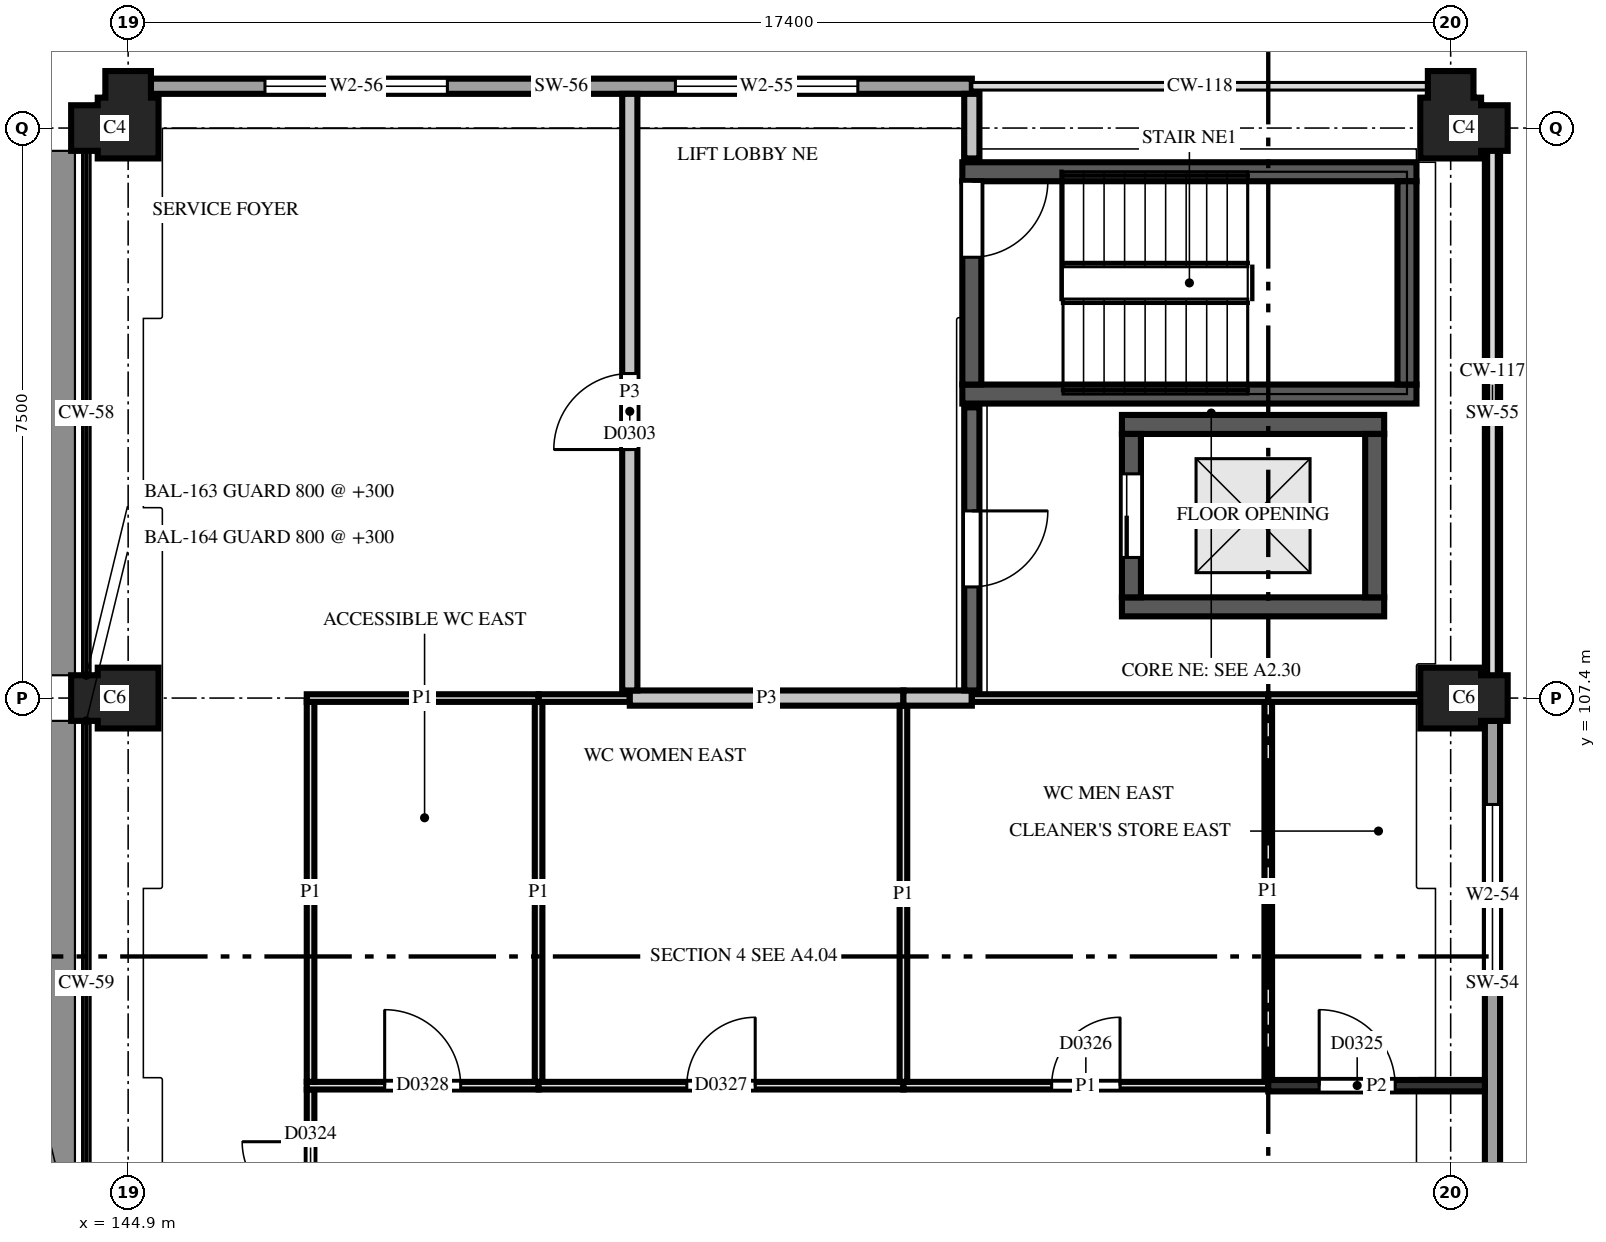
"""IFC4 building model, lengths in metres.
Left out: names, types, materials, properties, quantities, classifications, styles, units other than length and angle.
Written with IfcOpenShell. Run it as: python <this file> out.ifc"""

import sys

from ifc_helpers import new_model, si_unit, direction, frame, frame_2d, origin, place, context, subcontext, project, spatial, polyline, rectangle, outline, extrude, element, fill, save


model = new_model("IFC4")
c1 = context("Model", 3, precision=1e-05, world=origin(), true_north=direction((0.0, 1.0)))
c2 = subcontext(c1, "Body", "Model", "MODEL_VIEW")
j1 = project(units=[si_unit("LENGTHUNIT", "METRE"), si_unit("PLANEANGLEUNIT", "RADIAN")], contexts=[c1])
p1 = place(None, origin())
s1 = spatial("IfcSite", under=j1, at=p1, CompositionType="ELEMENT")
p2 = place(p1, origin())
s2 = spatial("IfcBuilding", under=s1, at=p2, CompositionType="ELEMENT")
p3 = place(p2, frame((0.0, 0.0, 11.9)))
s3 = spatial("IfcBuildingStorey", under=s2, at=p3, CompositionType="ELEMENT", Elevation=11.9)
for number, where, z_axis, x_axis in (
    (1, (144.9, 107.4, 0.0), (0.0, 0.0, 1.0), (-1.0, 0.0, 0.0)),
    (2, (162.3, 107.4, 0.0), (0.0, 0.0, 1.0), (1.0, 0.0, 0.0)),
):
    element("IfcColumn", number, at=place(p3, frame(where, z_axis=z_axis, x_axis=x_axis)), inside=s3, PredefinedType="COLUMN", context=c2, shape_type="SweptSolid", body=[
        extrude(outline(polyline([(-0.4, -0.4), (0.4, -0.4), (0.4, -0.3), (0.75, -0.3), (0.75, 0.3), (0.4, 0.3), (0.4, 0.4), (-0.4, 0.4), (-0.4, -0.4)])), origin(), (0.0, 0.0, 1.0), 3.7),
    ])
for number, where, z_axis, x_axis in (
    (3, (144.9, 114.9, 0.0), (0.0, 0.0, 1.0), (0.0, 1.0, 0.0)),
    (4, (162.3, 114.9, 0.0), (0.0, 0.0, 1.0), (1.0, 0.0, 0.0)),
):
    element("IfcColumn", number, at=place(p3, frame(where, z_axis=z_axis, x_axis=x_axis)), inside=s3, PredefinedType="COLUMN", context=c2, shape_type="SweptSolid", body=[
        extrude(outline(polyline([(-0.4, -0.4), (0.4, -0.4), (0.4, -0.3), (0.75, -0.3), (0.75, 0.3), (0.4, 0.3), (0.4, 0.4), (0.3, 0.4), (0.3, 0.75), (-0.3, 0.75), (-0.3, 0.4), (-0.4, 0.4), (-0.4, -0.4)])), origin(), (0.0, 0.0, 1.0), 3.7),
    ])
for number, where, z_axis, x_axis in (
    (5, (157.975, 108.6, 0.0), (0.0, 0.0, 1.0), (1.0, 0.0, 0.0)),
    (6, (157.975, 111.0, 0.0), (0.0, 0.0, 1.0), (1.0, 0.0, 0.0)),
):
    element("IfcWall", number, at=place(p3, frame(where, z_axis=z_axis, x_axis=x_axis)), inside=s3, PredefinedType="SHEAR", context=c2, shape_type="SweptSolid", body=[
        extrude(rectangle(XDim=3.45, YDim=0.25, at=frame_2d((1.725, 0.0))), origin(), (0.0, 0.0, 1.0), 3.7),
    ])
for number, where, z_axis, x_axis in (
    (7, (155.875, 111.4, 0.0), (0.0, 0.0, 1.0), (1.0, 0.0, 0.0)),
    (8, (155.875, 114.325, 0.0), (0.0, 0.0, 1.0), (1.0, 0.0, 0.0)),
):
    element("IfcWall", number, at=place(p3, frame(where, z_axis=z_axis, x_axis=x_axis)), inside=s3, PredefinedType="SHEAR", context=c2, shape_type="SweptSolid", body=[
        extrude(rectangle(XDim=5.975, YDim=0.25, at=frame_2d((2.988, 0.0))), origin(), (0.0, 0.0, 1.0), 3.7),
    ])
p4 = place(p3, frame((156.0, 111.525, 0.0), z_axis=(0.0, 0.0, 1.0), x_axis=(0.0, 1.0, 0.0)))
e9 = element("IfcWall", 9, at=p4, inside=s3, PredefinedType="SHEAR", context=c2, shape_type="SweptSolid", body=[
    extrude(rectangle(XDim=2.675, YDim=0.25, at=frame_2d((1.337, 0.0))), origin(), (0.0, 0.0, 1.0), 3.7),
])
p5 = place(p4, frame((1.675, 0.0, 0.0)))
e10 = element("IfcOpeningElement", 10, at=p5, cuts=e9, PredefinedType="OPENING", context=c2, shape_type="SweptSolid", body=[
    extrude(rectangle(XDim=1.0, YDim=2.1, at=frame_2d((0.5, 1.05))), frame((0.0, 0.135, 0.0), z_axis=(0.0, -1.0, 0.0), x_axis=(1.0, 0.0, 0.0)), (0.0, 0.0, 1.0), 0.27),
])
p6 = place(p3, frame((158.1, 108.725, 0.0), z_axis=(0.0, 0.0, 1.0), x_axis=(0.0, 1.0, 0.0)))
e11 = element("IfcWall", 11, at=p6, inside=s3, PredefinedType="SHEAR", context=c2, shape_type="SweptSolid", body=[
    extrude(rectangle(XDim=2.15, YDim=0.25, at=frame_2d((1.075, 0.0))), origin(), (0.0, 0.0, 1.0), 3.7),
])
p7 = place(p6, frame((0.525, 0.0, 0.0)))
e12 = element("IfcOpeningElement", 12, at=p7, cuts=e11, PredefinedType="OPENING", context=c2, shape_type="SweptSolid", body=[
    extrude(rectangle(XDim=1.1, YDim=2.1, at=frame_2d((0.55, 1.05))), frame((0.0, 0.135, 0.0), z_axis=(0.0, -1.0, 0.0), x_axis=(1.0, 0.0, 0.0)), (0.0, 0.0, 1.0), 0.27),
])
p8 = place(p3, frame((161.3, 108.725, 0.0), z_axis=(0.0, 0.0, 1.0), x_axis=(0.0, 1.0, 0.0)))
e13 = element("IfcWall", 13, at=p8, inside=s3, PredefinedType="SHEAR", context=c2, shape_type="SweptSolid", body=[
    extrude(rectangle(XDim=2.15, YDim=0.25, at=frame_2d((1.075, 0.0))), origin(), (0.0, 0.0, 1.0), 3.7),
])
p9 = place(p3, frame((161.725, 111.525, 0.0), z_axis=(0.0, 0.0, 1.0), x_axis=(0.0, 1.0, 0.0)))
e14 = element("IfcWall", 14, at=p9, inside=s3, PredefinedType="SHEAR", context=c2, shape_type="SweptSolid", body=[
    extrude(rectangle(XDim=2.675, YDim=0.25, at=frame_2d((1.337, 0.0))), origin(), (0.0, 0.0, 1.0), 3.7),
])
p10 = place(p3, frame((162.85, 100.2, 0.0), z_axis=(0.0, 0.0, 1.0), x_axis=(0.0, 1.0, 0.0)))
e15 = element("IfcWall", 15, at=p10, inside=s3, PredefinedType="SOLIDWALL", context=c2, shape_type="SweptSolid", body=[
    extrude(rectangle(XDim=6.9, YDim=0.2, at=frame_2d((3.45, 0.0))), origin(), (0.0, 0.0, 1.0), 2.3),
])
p11 = place(p10, frame((3.4, 0.0, 0.55)))
e16 = element("IfcOpeningElement", 16, at=p11, cuts=e15, PredefinedType="OPENING", context=c2, shape_type="SweptSolid", body=[
    extrude(rectangle(XDim=2.4, YDim=1.0, at=frame_2d((1.2, 0.5))), frame((0.0, 0.11, 0.0), z_axis=(0.0, -1.0, 0.0), x_axis=(1.0, 0.0, 0.0)), (0.0, 0.0, 1.0), 0.22),
])
p12 = place(p3, frame((162.85, 107.7, 0.0), z_axis=(0.0, 0.0, 1.0), x_axis=(0.0, 1.0, 0.0)))
e17 = element("IfcWall", 17, at=p12, inside=s3, PredefinedType="SOLIDWALL", context=c2, shape_type="SweptSolid", body=[
    extrude(rectangle(XDim=6.9, YDim=0.2, at=frame_2d((3.45, 0.0))), origin(), (0.0, 0.0, 1.0), 2.3),
])
p13 = place(p3, frame((156.0, 115.45, 0.0), z_axis=(0.0, 0.0, 1.0), x_axis=(-1.0, 0.0, 0.0)))
e18 = element("IfcWall", 18, at=p13, inside=s3, PredefinedType="SOLIDWALL", context=c2, shape_type="SweptSolid", body=[
    extrude(rectangle(XDim=10.8, YDim=0.2, at=frame_2d((5.4, 0.0))), origin(), (0.0, 0.0, 1.0), 1.7),
])
p14 = place(p13, frame((1.5, 0.0, 0.55)))
e19 = element("IfcOpeningElement", 19, at=p14, cuts=e18, PredefinedType="OPENING", context=c2, shape_type="SweptSolid", body=[
    extrude(rectangle(XDim=2.4, YDim=1.0, at=frame_2d((1.2, 0.5))), frame((0.0, 0.11, 0.0), z_axis=(0.0, -1.0, 0.0), x_axis=(1.0, 0.0, 0.0)), (0.0, 0.0, 1.0), 0.22),
])
p15 = place(p13, frame((6.9, 0.0, 0.55)))
e20 = element("IfcOpeningElement", 20, at=p15, cuts=e18, PredefinedType="OPENING", context=c2, shape_type="SweptSolid", body=[
    extrude(rectangle(XDim=2.4, YDim=1.0, at=frame_2d((1.2, 0.5))), frame((0.0, 0.11, 0.0), z_axis=(0.0, -1.0, 0.0), x_axis=(1.0, 0.0, 0.0)), (0.0, 0.0, 1.0), 0.22),
])
p16 = place(p3, frame((147.3, 102.25, 0.0), z_axis=(0.0, 0.0, 1.0), x_axis=(0.0, -1.0, 0.0)))
e21 = element("IfcWall", 21, at=p16, inside=s3, PredefinedType="PARTITIONING", context=c2, shape_type="SweptSolid", body=[
    extrude(rectangle(XDim=2.275, YDim=0.1, at=frame_2d((1.137, 0.0))), origin(), (0.0, 0.0, 1.0), 2.88),
])
p17 = place(p16, frame((0.688, 0.0, 0.0)))
e22 = element("IfcOpeningElement", 22, at=p17, cuts=e21, PredefinedType="OPENING", context=c2, shape_type="SweptSolid", body=[
    extrude(rectangle(XDim=0.9, YDim=2.1, at=frame_2d((0.45, 1.05))), frame((0.0, 0.06, 0.0), z_axis=(0.0, -1.0, 0.0), x_axis=(1.0, 0.0, 0.0)), (0.0, 0.0, 1.0), 0.12),
])
p18 = place(p3, frame((150.3, 102.3, 0.0), z_axis=(0.0, 0.0, 1.0), x_axis=(-1.0, 0.0, 0.0)))
e23 = element("IfcWall", 23, at=p18, inside=s3, PredefinedType="PARTITIONING", context=c2, shape_type="SweptSolid", body=[
    extrude(rectangle(XDim=3.05, YDim=0.1, at=frame_2d((1.525, 0.0))), origin(), (0.0, 0.0, 1.0), 2.88),
])
p19 = place(p18, frame((1.025, 0.0, 0.0)))
e24 = element("IfcOpeningElement", 24, at=p19, cuts=e23, PredefinedType="OPENING", context=c2, shape_type="SweptSolid", body=[
    extrude(rectangle(XDim=1.0, YDim=2.1, at=frame_2d((0.5, 1.05))), frame((0.0, 0.06, 0.0), z_axis=(0.0, -1.0, 0.0), x_axis=(1.0, 0.0, 0.0)), (0.0, 0.0, 1.0), 0.12),
])
p20 = place(p3, frame((155.1, 102.3, 0.0), z_axis=(0.0, 0.0, 1.0), x_axis=(-1.0, 0.0, 0.0)))
e25 = element("IfcWall", 25, at=p20, inside=s3, PredefinedType="PARTITIONING", context=c2, shape_type="SweptSolid", body=[
    extrude(rectangle(XDim=4.8, YDim=0.1, at=frame_2d((2.4, 0.0))), origin(), (0.0, 0.0, 1.0), 2.88),
])
p21 = place(p20, frame((1.95, 0.0, 0.0)))
e26 = element("IfcOpeningElement", 26, at=p21, cuts=e25, PredefinedType="OPENING", context=c2, shape_type="SweptSolid", body=[
    extrude(rectangle(XDim=0.9, YDim=2.1, at=frame_2d((0.45, 1.05))), frame((0.0, 0.06, 0.0), z_axis=(0.0, -1.0, 0.0), x_axis=(1.0, 0.0, 0.0)), (0.0, 0.0, 1.0), 0.12),
])
p22 = place(p3, frame((159.9, 102.3, 0.0), z_axis=(0.0, 0.0, 1.0), x_axis=(-1.0, 0.0, 0.0)))
e27 = element("IfcWall", 27, at=p22, inside=s3, PredefinedType="PARTITIONING", context=c2, shape_type="SweptSolid", body=[
    extrude(rectangle(XDim=4.8, YDim=0.1, at=frame_2d((2.4, 0.0))), origin(), (0.0, 0.0, 1.0), 2.88),
])
p23 = place(p22, frame((1.95, 0.0, 0.0)))
e28 = element("IfcOpeningElement", 28, at=p23, cuts=e27, PredefinedType="OPENING", context=c2, shape_type="SweptSolid", body=[
    extrude(rectangle(XDim=0.9, YDim=2.1, at=frame_2d((0.45, 1.05))), frame((0.0, 0.06, 0.0), z_axis=(0.0, -1.0, 0.0), x_axis=(1.0, 0.0, 0.0)), (0.0, 0.0, 1.0), 0.12),
])
p24 = place(p3, frame((162.75, 102.3, 0.0), z_axis=(0.0, 0.0, 1.0), x_axis=(-1.0, 0.0, 0.0)))
e29 = element("IfcWall", 29, at=p24, inside=s3, PredefinedType="PARTITIONING", context=c2, shape_type="SweptSolid", body=[
    extrude(rectangle(XDim=2.85, YDim=0.15, at=frame_2d((1.425, 0.0))), origin(), (0.0, 0.0, 1.0), 2.88),
])
p25 = place(p24, frame((1.18, 0.0, 0.0)))
e30 = element("IfcOpeningElement", 30, at=p25, cuts=e29, PredefinedType="OPENING", context=c2, shape_type="SweptSolid", body=[
    extrude(rectangle(XDim=1.0, YDim=2.1, at=frame_2d((0.5, 1.05))), frame((0.0, 0.085, 0.0), z_axis=(0.0, -1.0, 0.0), x_axis=(1.0, 0.0, 0.0)), (0.0, 0.0, 1.0), 0.17),
])
for number, where, z_axis, x_axis in (
    (31, (147.3, 107.35, 0.0), (0.0, 0.0, 1.0), (0.0, -1.0, 0.0)),
    (32, (150.3, 107.35, 0.0), (0.0, 0.0, 1.0), (0.0, -1.0, 0.0)),
):
    element("IfcWall", number, at=place(p3, frame(where, z_axis=z_axis, x_axis=x_axis)), inside=s3, PredefinedType="PARTITIONING", context=c2, shape_type="SweptSolid", body=[
        extrude(rectangle(XDim=5.0, YDim=0.1, at=frame_2d((2.5, 0.0))), origin(), (0.0, 0.0, 1.0), 2.88),
    ])
p26 = place(p3, frame((150.3, 107.4, 0.0), z_axis=(0.0, 0.0, 1.0), x_axis=(-1.0, 0.0, 0.0)))
e33 = element("IfcWall", 33, at=p26, inside=s3, PredefinedType="PARTITIONING", context=c2, shape_type="SweptSolid", body=[
    extrude(rectangle(XDim=3.05, YDim=0.1, at=frame_2d((1.525, 0.0))), origin(), (0.0, 0.0, 1.0), 2.88),
])
p27 = place(p3, frame((151.5, 107.4, 0.0), z_axis=(0.0, 0.0, 1.0), x_axis=(-1.0, 0.0, 0.0)))
e34 = element("IfcWall", 34, at=p27, inside=s3, PredefinedType="PARTITIONING", context=c2, shape_type="SweptSolid", body=[
    extrude(rectangle(XDim=1.2, YDim=0.1, at=frame_2d((0.6, 0.0))), origin(), (0.0, 0.0, 1.0), 2.88),
])
p28 = place(p3, frame((151.5, 107.4, 0.0), z_axis=(0.0, 0.0, 1.0), x_axis=(1.0, 0.0, 0.0)))
e35 = element("IfcWall", 35, at=p28, inside=s3, PredefinedType="PARTITIONING", context=c2, shape_type="SweptSolid", body=[
    extrude(rectangle(XDim=3.6, YDim=0.2, at=frame_2d((1.8, 0.0))), origin(), (0.0, 0.0, 1.0), 2.88),
])
p29 = place(p3, frame((155.1, 107.3, 0.0), z_axis=(0.0, 0.0, 1.0), x_axis=(0.0, -1.0, 0.0)))
e36 = element("IfcWall", 36, at=p29, inside=s3, PredefinedType="PARTITIONING", context=c2, shape_type="SweptSolid", body=[
    extrude(rectangle(XDim=4.95, YDim=0.1, at=frame_2d((2.475, 0.0))), origin(), (0.0, 0.0, 1.0), 2.88),
])
p30 = place(p3, frame((155.1, 107.4, 0.0), z_axis=(0.0, 0.0, 1.0), x_axis=(1.0, 0.0, 0.0)))
e37 = element("IfcWall", 37, at=p30, inside=s3, PredefinedType="PARTITIONING", context=c2, shape_type="SweptSolid", body=[
    extrude(rectangle(XDim=0.9, YDim=0.2, at=frame_2d((0.45, 0.0))), origin(), (0.0, 0.0, 1.0), 2.88),
])
p31 = place(p3, frame((156.0, 107.5, 0.0), z_axis=(0.0, 0.0, 1.0), x_axis=(0.0, 1.0, 0.0)))
e38 = element("IfcWall", 38, at=p31, inside=s3, PredefinedType="PARTITIONING", context=c2, shape_type="SweptSolid", body=[
    extrude(rectangle(XDim=3.725, YDim=0.2, at=frame_2d((1.863, 0.0))), origin(), (0.0, 0.0, 1.0), 2.88),
])
p32 = place(p31, frame((1.363, 0.0, 0.0)))
e39 = element("IfcOpeningElement", 39, at=p32, cuts=e38, PredefinedType="OPENING", context=c2, shape_type="SweptSolid", body=[
    extrude(rectangle(XDim=1.0, YDim=2.1, at=frame_2d((0.5, 1.05))), frame((0.0, 0.11, 0.0), z_axis=(0.0, -1.0, 0.0), x_axis=(1.0, 0.0, 0.0)), (0.0, 0.0, 1.0), 0.22),
])
p33 = place(p3, frame((159.9, 107.35, 0.0), z_axis=(0.0, 0.0, 1.0), x_axis=(0.0, -1.0, 0.0)))
e40 = element("IfcWall", 40, at=p33, inside=s3, PredefinedType="PARTITIONING", context=c2, shape_type="SweptSolid", body=[
    extrude(rectangle(XDim=4.975, YDim=0.1, at=frame_2d((2.488, 0.0))), origin(), (0.0, 0.0, 1.0), 2.88),
])
p34 = place(p3, frame((159.9, 107.4, 0.0), z_axis=(0.0, 0.0, 1.0), x_axis=(-1.0, 0.0, 0.0)))
e41 = element("IfcWall", 41, at=p34, inside=s3, PredefinedType="PARTITIONING", context=c2, shape_type="SweptSolid", body=[
    extrude(rectangle(XDim=3.9, YDim=0.1, at=frame_2d((1.95, 0.0))), origin(), (0.0, 0.0, 1.0), 2.88),
])
p35 = place(p3, frame((162.24, 107.4, 0.0), z_axis=(0.0, 0.0, 1.0), x_axis=(-1.0, 0.0, 0.0)))
e42 = element("IfcWall", 42, at=p35, inside=s3, PredefinedType="PARTITIONING", context=c2, shape_type="SweptSolid", body=[
    extrude(rectangle(XDim=2.34, YDim=0.1, at=frame_2d((1.17, 0.0))), origin(), (0.0, 0.0, 1.0), 2.88),
])
p36 = place(p3, frame((156.0, 114.5, 0.0), z_axis=(0.0, 0.0, 1.0), x_axis=(0.0, 1.0, 0.0)))
e43 = element("IfcWall", 43, at=p36, inside=s3, PredefinedType="PARTITIONING", context=c2, shape_type="SweptSolid", body=[
    extrude(rectangle(XDim=0.85, YDim=0.2, at=frame_2d((0.425, 0.0))), origin(), (0.0, 0.0, 1.0), 2.88),
])
p37 = place(p3, frame((151.5, 115.35, 0.0), z_axis=(0.0, 0.0, 1.0), x_axis=(0.0, -1.0, 0.0)))
e44 = element("IfcWall", 44, at=p37, inside=s3, PredefinedType="PARTITIONING", context=c2, shape_type="SweptSolid", body=[
    extrude(rectangle(XDim=7.85, YDim=0.2, at=frame_2d((3.925, 0.0))), origin(), (0.0, 0.0, 1.0), 2.88),
])
p38 = place(p37, frame((3.68, 0.0, 0.0)))
e45 = element("IfcOpeningElement", 45, at=p38, cuts=e44, PredefinedType="OPENING", context=c2, shape_type="SweptSolid", body=[
    extrude(rectangle(XDim=1.0, YDim=2.1, at=frame_2d((0.5, 1.05))), frame((0.0, 0.11, 0.0), z_axis=(0.0, -1.0, 0.0), x_axis=(1.0, 0.0, 0.0)), (0.0, 0.0, 1.0), 0.22),
])
p39 = place(p11, origin())
e46 = element("IfcWindow", 46, at=p39, inside=s3, PartitioningType="SINGLE_PANEL", PredefinedType="WINDOW", context=c2, shape_type="SweptSolid", body=[
    extrude(rectangle(XDim=2.4, YDim=1.0, at=frame_2d((1.2, 0.5))), frame((0.0, 0.03, 0.0), z_axis=(0.0, -1.0, 0.0), x_axis=(1.0, 0.0, 0.0)), (0.0, 0.0, 1.0), 0.06),
])
fill(e16, e46)
p40 = place(p14, origin())
e47 = element("IfcWindow", 47, at=p40, inside=s3, PartitioningType="SINGLE_PANEL", PredefinedType="WINDOW", context=c2, shape_type="SweptSolid", body=[
    extrude(rectangle(XDim=2.4, YDim=1.0, at=frame_2d((1.2, 0.5))), frame((0.0, 0.03, 0.0), z_axis=(0.0, -1.0, 0.0), x_axis=(1.0, 0.0, 0.0)), (0.0, 0.0, 1.0), 0.06),
])
fill(e19, e47)
p41 = place(p15, origin())
e48 = element("IfcWindow", 48, at=p41, inside=s3, PartitioningType="SINGLE_PANEL", PredefinedType="WINDOW", context=c2, shape_type="SweptSolid", body=[
    extrude(rectangle(XDim=2.4, YDim=1.0, at=frame_2d((1.2, 0.5))), frame((0.0, 0.03, 0.0), z_axis=(0.0, -1.0, 0.0), x_axis=(1.0, 0.0, 0.0)), (0.0, 0.0, 1.0), 0.06),
])
fill(e20, e48)
p42 = place(p38, origin())
e49 = element("IfcDoor", 49, at=p42, inside=s3, OperationType="SINGLE_SWING_RIGHT", PredefinedType="DOOR", context=c2, shape_type="SweptSolid", body=[
    extrude(rectangle(XDim=1.0, YDim=2.1, at=frame_2d((0.5, 1.05))), frame((0.0, 0.025, 0.0), z_axis=(0.0, -1.0, 0.0), x_axis=(1.0, 0.0, 0.0)), (0.0, 0.0, 1.0), 0.05),
])
fill(e45, e49)
p43 = place(p17, origin())
e50 = element("IfcDoor", 50, at=p43, inside=s3, OperationType="SINGLE_SWING_LEFT", PredefinedType="DOOR", context=c2, shape_type="SweptSolid", body=[
    extrude(rectangle(XDim=0.9, YDim=2.1, at=frame_2d((0.45, 1.05))), frame((0.0, 0.025, 0.0), z_axis=(0.0, -1.0, 0.0), x_axis=(1.0, 0.0, 0.0)), (0.0, 0.0, 1.0), 0.05),
])
fill(e22, e50)
p44 = place(p25, origin())
e51 = element("IfcDoor", 51, at=p44, inside=s3, OperationType="SINGLE_SWING_RIGHT", PredefinedType="DOOR", context=c2, shape_type="SweptSolid", body=[
    extrude(rectangle(XDim=1.0, YDim=2.1, at=frame_2d((0.5, 1.05))), frame((0.0, 0.025, 0.0), z_axis=(0.0, -1.0, 0.0), x_axis=(1.0, 0.0, 0.0)), (0.0, 0.0, 1.0), 0.05),
])
fill(e30, e51)
p45 = place(p23, origin())
e52 = element("IfcDoor", 52, at=p45, inside=s3, OperationType="SINGLE_SWING_LEFT", PredefinedType="DOOR", context=c2, shape_type="SweptSolid", body=[
    extrude(rectangle(XDim=0.9, YDim=2.1, at=frame_2d((0.45, 1.05))), frame((0.0, 0.025, 0.0), z_axis=(0.0, -1.0, 0.0), x_axis=(1.0, 0.0, 0.0)), (0.0, 0.0, 1.0), 0.05),
])
fill(e28, e52)
p46 = place(p21, origin())
e53 = element("IfcDoor", 53, at=p46, inside=s3, OperationType="SINGLE_SWING_LEFT", PredefinedType="DOOR", context=c2, shape_type="SweptSolid", body=[
    extrude(rectangle(XDim=0.9, YDim=2.1, at=frame_2d((0.45, 1.05))), frame((0.0, 0.025, 0.0), z_axis=(0.0, -1.0, 0.0), x_axis=(1.0, 0.0, 0.0)), (0.0, 0.0, 1.0), 0.05),
])
fill(e26, e53)
p47 = place(p19, origin())
e54 = element("IfcDoor", 54, at=p47, inside=s3, OperationType="SINGLE_SWING_RIGHT", PredefinedType="DOOR", context=c2, shape_type="SweptSolid", body=[
    extrude(rectangle(XDim=1.0, YDim=2.1, at=frame_2d((0.5, 1.05))), frame((0.0, 0.025, 0.0), z_axis=(0.0, -1.0, 0.0), x_axis=(1.0, 0.0, 0.0)), (0.0, 0.0, 1.0), 0.05),
])
fill(e24, e54)
p48 = place(p7, origin())
e55 = element("IfcDoor", 55, at=p48, inside=s3, OperationType="SLIDING_TO_LEFT", PredefinedType="DOOR", context=c2, shape_type="SweptSolid", body=[
    extrude(rectangle(XDim=1.1, YDim=2.1, at=frame_2d((0.55, 1.05))), frame((0.0, 0.025, 0.0), z_axis=(0.0, -1.0, 0.0), x_axis=(1.0, 0.0, 0.0)), (0.0, 0.0, 1.0), 0.05),
])
fill(e12, e55)
p49 = place(p5, origin())
e56 = element("IfcDoor", 56, at=p49, inside=s3, OperationType="SINGLE_SWING_RIGHT", PredefinedType="DOOR", context=c2, shape_type="SweptSolid", body=[
    extrude(rectangle(XDim=1.0, YDim=2.1, at=frame_2d((0.5, 1.05))), frame((0.0, 0.025, 0.0), z_axis=(0.0, -1.0, 0.0), x_axis=(1.0, 0.0, 0.0)), (0.0, 0.0, 1.0), 0.05),
])
fill(e10, e56)
p50 = place(p32, origin())
e57 = element("IfcDoor", 57, at=p50, inside=s3, OperationType="SINGLE_SWING_RIGHT", PredefinedType="DOOR", context=c2, shape_type="SweptSolid", body=[
    extrude(rectangle(XDim=1.0, YDim=2.1, at=frame_2d((0.5, 1.05))), frame((0.0, 0.025, 0.0), z_axis=(0.0, -1.0, 0.0), x_axis=(1.0, 0.0, 0.0)), (0.0, 0.0, 1.0), 0.05),
])
fill(e39, e57)
save(model, sys.argv[1])
